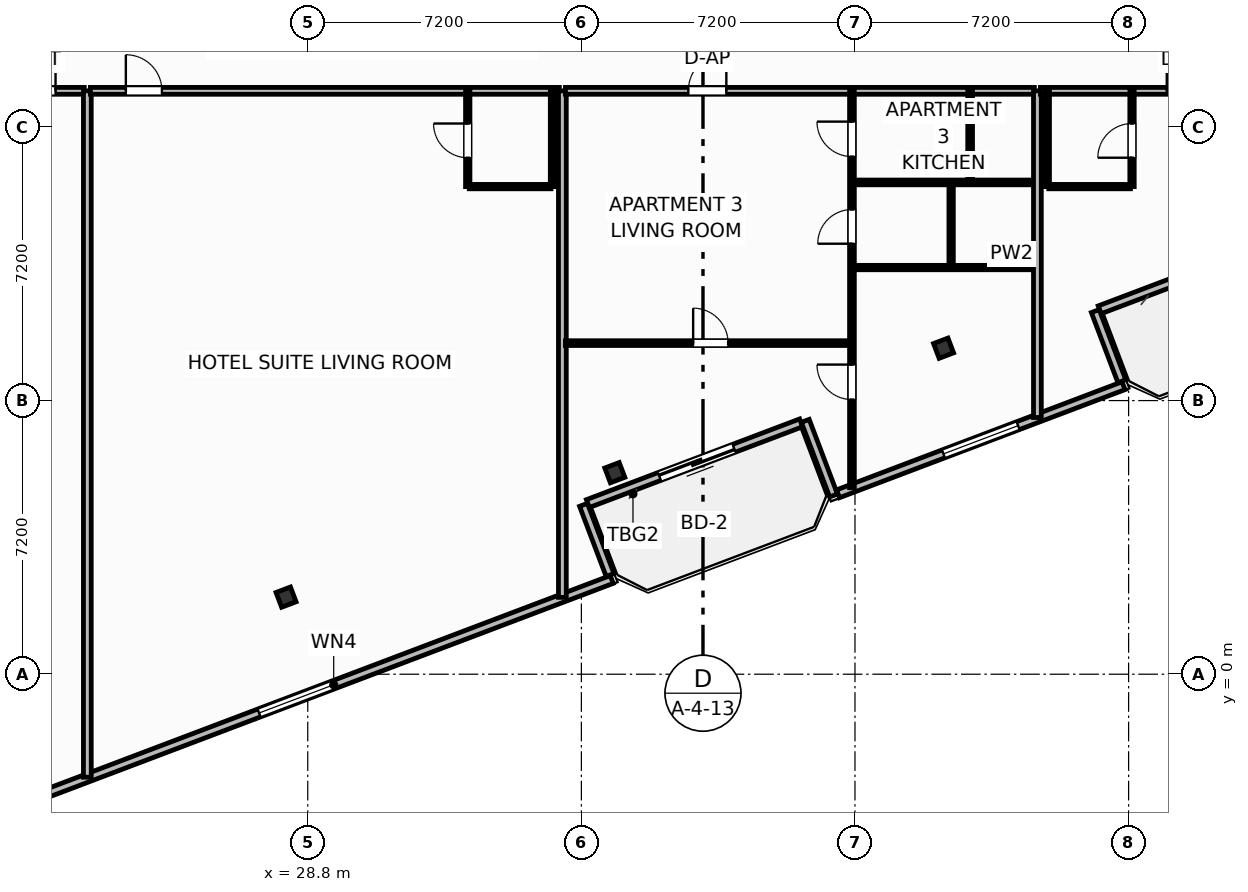
"""IFC4 building model, lengths in metres.
Left out: names, types, materials, properties, quantities, classifications, styles, units other than length and angle.
Written with IfcOpenShell. Run it as: python <this file> out.ifc"""

import sys

from ifc_helpers import new_model, si_unit, direction, frame, frame_2d, origin, origin_2d, place, context, subcontext, project, spatial, rectangle, i_section, extrude, element, fill, save


model = new_model("IFC4")
c1 = context("Model", 3, precision=1e-05, world=origin(), true_north=direction((0.0, 1.0)))
c2 = subcontext(c1, "Body", "Model", "MODEL_VIEW")
j1 = project(units=[si_unit("LENGTHUNIT", "METRE"), si_unit("PLANEANGLEUNIT", "RADIAN")], contexts=[c1])
p1 = place(None, origin())
s1 = spatial("IfcSite", under=j1, at=p1, CompositionType="ELEMENT")
p2 = place(p1, origin())
s2 = spatial("IfcBuilding", under=s1, at=p2, CompositionType="ELEMENT")
p3 = place(p2, frame((0.0, 0.0, 223.8)))
s3 = spatial("IfcBuildingStorey", under=s2, at=p3, CompositionType="ELEMENT", Elevation=223.8)
for number, where, z_axis, x_axis in (
    (1, (28.229, 2.028, 0.0), (0.0, 0.0, 1.0), (0.935, 0.354, 0.0)),
    (2, (36.88, 5.303, 0.0), (0.0, 0.0, 1.0), (0.935, 0.354, 0.0)),
    (3, (45.531, 8.578, 0.0), (0.0, 0.0, 1.0), (0.935, 0.354, 0.0)),
):
    element("IfcColumn", number, at=place(p3, frame(where, z_axis=z_axis, x_axis=x_axis)), inside=s3, PredefinedType="COLUMN", context=c2, shape_type="SweptSolid", body=[
        extrude(i_section(OverallWidth=0.406, OverallDepth=0.416, WebThickness=0.03, FlangeThickness=0.048, FilletRadius=0.025, at=origin_2d()), origin(), (0.0, 0.0, 1.0), 3.7),
    ])
p4 = place(p3, frame((41.783, 6.614, 0.0), z_axis=(0.0, 0.0, 1.0), x_axis=(-0.93521416643, -0.354082565101, 0.0)))
e4 = element("IfcWall", 4, at=p4, inside=s3, PredefinedType="SOLIDWALL", context=c2, shape_type="SweptSolid", body=[
    extrude(rectangle(XDim=6.0, YDim=0.22, at=frame_2d((3.0, 0.0))), origin(), (0.0, 0.0, 1.0), 2.73),
])
p5 = place(p4, frame((1.888, 0.0, 0.0)))
e5 = element("IfcOpeningElement", 5, at=p5, cuts=e4, PredefinedType="OPENING", context=c2, shape_type="SweptSolid", body=[
    extrude(rectangle(XDim=2.1, YDim=2.3, at=frame_2d((1.05, 1.15))), frame((0.0, 0.12, 0.0), z_axis=(0.0, -1.0, 0.0), x_axis=(1.0, 0.0, 0.0)), (0.0, 0.0, 1.0), 0.24),
])
p6 = place(p3, frame((55.25, 11.713, 0.0), z_axis=(0.0, 0.0, 1.0), x_axis=(-0.935227640088, -0.354046976001, 0.0)))
e6 = element("IfcWall", 6, at=p6, inside=s3, PredefinedType="SOLIDWALL", context=c2, shape_type="SweptSolid", body=[
    extrude(rectangle(XDim=6.0, YDim=0.22, at=frame_2d((3.0, 0.0))), origin(), (0.0, 0.0, 1.0), 2.73),
])
p7 = place(p6, frame((1.888, 0.0, 0.0)))
e7 = element("IfcOpeningElement", 7, at=p7, cuts=e6, PredefinedType="OPENING", context=c2, shape_type="SweptSolid", body=[
    extrude(rectangle(XDim=2.1, YDim=2.3, at=frame_2d((1.05, 1.15))), frame((0.0, 0.12, 0.0), z_axis=(0.0, -1.0, 0.0), x_axis=(1.0, 0.0, 0.0)), (0.0, 0.0, 1.0), 0.24),
])
p8 = place(p3, frame((20.202, -3.791, 0.0), z_axis=(0.0, 0.0, 1.0), x_axis=(0.935225574232, 0.354052432984, 0.0)))
e8 = element("IfcWall", 8, at=p8, inside=s3, PredefinedType="SOLIDWALL", context=c2, shape_type="SweptSolid", body=[
    extrude(rectangle(XDim=17.747, YDim=0.22, at=frame_2d((8.874, 0.0))), origin(), (0.0, 0.0, 1.0), 2.73),
])
p9 = place(p8, frame((7.823, 0.0, 0.8)))
e9 = element("IfcOpeningElement", 9, at=p9, cuts=e8, PredefinedType="OPENING", context=c2, shape_type="SweptSolid", body=[
    extrude(rectangle(XDim=2.1, YDim=1.75, at=frame_2d((1.05, 0.875))), frame((0.0, 0.12, 0.0), z_axis=(0.0, -1.0, 0.0), x_axis=(1.0, 0.0, 0.0)), (0.0, 0.0, 1.0), 0.24),
])
p10 = place(p3, frame((36.755, 2.61, 0.0), z_axis=(0.0, 0.0, 1.0), x_axis=(-0.354020680661, 0.935237594232, 0.0)))
e10 = element("IfcWall", 10, at=p10, inside=s3, PredefinedType="SOLIDWALL", context=c2, shape_type="SweptSolid", body=[
    extrude(rectangle(XDim=1.975, YDim=0.22, at=frame_2d((0.988, 0.0))), origin(), (0.0, 0.0, 1.0), 2.73),
])
p11 = place(p3, frame((41.892, 6.666, 0.0), z_axis=(0.0, 0.0, 1.0), x_axis=(0.354128469405, -0.935196785258, 0.0)))
e11 = element("IfcWall", 11, at=p11, inside=s3, PredefinedType="SOLIDWALL", context=c2, shape_type="SweptSolid", body=[
    extrude(rectangle(XDim=2.1, YDim=0.22, at=frame_2d((1.05, 0.0))), origin(), (0.0, 0.0, 1.0), 2.73),
])
p12 = place(p3, frame((42.752, 4.746, 0.0), z_axis=(0.0, 0.0, 1.0), x_axis=(0.935216926991, 0.354075273733, 0.0)))
e12 = element("IfcWall", 12, at=p12, inside=s3, PredefinedType="SOLIDWALL", context=c2, shape_type="SweptSolid", body=[
    extrude(rectangle(XDim=8.035, YDim=0.22, at=frame_2d((4.018, 0.0))), origin(), (0.0, 0.0, 1.0), 2.73),
])
p13 = place(p12, frame((2.968, 0.0, 0.8)))
e13 = element("IfcOpeningElement", 13, at=p13, cuts=e12, PredefinedType="OPENING", context=c2, shape_type="SweptSolid", body=[
    extrude(rectangle(XDim=2.1, YDim=1.75, at=frame_2d((1.05, 0.875))), frame((0.0, 0.12, 0.0), z_axis=(0.0, -1.0, 0.0), x_axis=(1.0, 0.0, 0.0)), (0.0, 0.0, 1.0), 0.24),
])
p14 = place(p3, frame((50.223, 7.708, 0.0), z_axis=(0.0, 0.0, 1.0), x_axis=(-0.354020680661, 0.935237594232, 0.0)))
e14 = element("IfcWall", 14, at=p14, inside=s3, PredefinedType="SOLIDWALL", context=c2, shape_type="SweptSolid", body=[
    extrude(rectangle(XDim=1.975, YDim=0.22, at=frame_2d((0.988, 0.0))), origin(), (0.0, 0.0, 1.0), 2.73),
])
p15 = place(p3, frame((7.764, 15.35, 0.0), z_axis=(0.0, 0.0, 1.0), x_axis=(1.0, 0.0, 0.0)))
e15 = element("IfcWall", 15, at=p15, inside=s3, PredefinedType="PARTITIONING", context=c2, shape_type="SweptSolid", body=[
    extrude(rectangle(XDim=15.156, YDim=0.18, at=frame_2d((7.578, 0.0))), origin(), (0.0, 0.0, 1.0), 3.45),
])
p16 = place(p15, frame((13.45, 0.0, 0.0)))
e16 = element("IfcOpeningElement", 16, at=p16, cuts=e15, PredefinedType="OPENING", context=c2, shape_type="SweptSolid", body=[
    extrude(rectangle(XDim=0.95, YDim=2.15, at=frame_2d((0.475, 1.075))), frame((0.0, 0.1, 0.0), z_axis=(0.0, -1.0, 0.0), x_axis=(1.0, 0.0, 0.0)), (0.0, 0.0, 1.0), 0.2),
])
p17 = place(p3, frame((23.0, -2.71, 0.0), z_axis=(0.0, 0.0, 1.0), x_axis=(0.0, 1.0, 0.0)))
e17 = element("IfcWall", 17, at=p17, inside=s3, PredefinedType="PARTITIONING", context=c2, shape_type="SweptSolid", body=[
    extrude(rectangle(XDim=18.06, YDim=0.205, at=frame_2d((9.03, 0.0))), origin(), (0.0, 0.0, 1.0), 3.45),
])
p18 = place(p3, frame((23.08, 15.35, 0.0), z_axis=(0.0, 0.0, 1.0), x_axis=(1.0, 0.0, 0.0)))
e18 = element("IfcWall", 18, at=p18, inside=s3, PredefinedType="PARTITIONING", context=c2, shape_type="SweptSolid", body=[
    extrude(rectangle(XDim=12.34, YDim=0.18, at=frame_2d((6.17, 0.0))), origin(), (0.0, 0.0, 1.0), 3.45),
])
p19 = place(p18, frame((0.933, 0.0, 0.0)))
e19 = element("IfcOpeningElement", 19, at=p19, cuts=e18, PredefinedType="OPENING", context=c2, shape_type="SweptSolid", body=[
    extrude(rectangle(XDim=0.95, YDim=2.15, at=frame_2d((0.475, 1.075))), frame((0.0, 0.1, 0.0), z_axis=(0.0, -1.0, 0.0), x_axis=(1.0, 0.0, 0.0)), (0.0, 0.0, 1.0), 0.2),
])
p20 = place(p3, frame((33.05, 12.83, 0.0), z_axis=(0.0, 0.0, 1.0), x_axis=(1.0, 0.0, 0.0)))
e20 = element("IfcWall", 20, at=p20, inside=s3, PredefinedType="PARTITIONING", context=c2, shape_type="SweptSolid", body=[
    extrude(rectangle(XDim=2.15, YDim=0.115, at=frame_2d((1.075, 0.0))), origin(), (0.0, 0.0, 1.0), 3.45),
])
p21 = place(p3, frame((33.01, 12.83, 0.0), z_axis=(0.0, 0.0, 1.0), x_axis=(0.0, 1.0, 0.0)))
e21 = element("IfcWall", 21, at=p21, inside=s3, PredefinedType="PARTITIONING", context=c2, shape_type="SweptSolid", body=[
    extrude(rectangle(XDim=2.52, YDim=0.115, at=frame_2d((1.26, 0.0))), origin(), (0.0, 0.0, 1.0), 3.45),
])
p22 = place(p21, frame((0.76, 0.0, 0.0)))
e22 = element("IfcOpeningElement", 22, at=p22, cuts=e21, PredefinedType="OPENING", context=c2, shape_type="SweptSolid", body=[
    extrude(rectangle(XDim=0.9, YDim=2.05, at=frame_2d((0.45, 1.025))), frame((0.0, 0.067, 0.0), z_axis=(0.0, -1.0, 0.0), x_axis=(1.0, 0.0, 0.0)), (0.0, 0.0, 1.0), 0.135),
])
p23 = place(p3, frame((35.24, 12.83, 0.0), z_axis=(0.0, 0.0, 1.0), x_axis=(0.0, 1.0, 0.0)))
e23 = element("IfcWall", 23, at=p23, inside=s3, PredefinedType="PARTITIONING", context=c2, shape_type="SweptSolid", body=[
    extrude(rectangle(XDim=2.52, YDim=0.115, at=frame_2d((1.26, 0.0))), origin(), (0.0, 0.0, 1.0), 2.739),
])
p24 = place(p3, frame((35.5, 2.022, 0.0), z_axis=(0.0, 0.0, 1.0), x_axis=(0.0, 1.0, 0.0)))
e24 = element("IfcWall", 24, at=p24, inside=s3, PredefinedType="PARTITIONING", context=c2, shape_type="SweptSolid", body=[
    extrude(rectangle(XDim=13.328, YDim=0.205, at=frame_2d((6.664, 0.0))), origin(), (0.0, 0.0, 1.0), 2.739),
])
p25 = place(p3, frame((35.58, 8.712, 0.0), z_axis=(0.0, 0.0, 1.0), x_axis=(1.0, 0.0, 0.0)))
e25 = element("IfcWall", 25, at=p25, inside=s3, PredefinedType="PARTITIONING", context=c2, shape_type="SweptSolid", body=[
    extrude(rectangle(XDim=7.47, YDim=0.125, at=frame_2d((3.735, 0.0))), origin(), (0.0, 0.0, 1.0), 3.45),
])
p26 = place(p25, frame((3.362, 0.0, 0.0)))
e26 = element("IfcOpeningElement", 26, at=p26, cuts=e25, PredefinedType="OPENING", context=c2, shape_type="SweptSolid", body=[
    extrude(rectangle(XDim=0.92, YDim=2.05, at=frame_2d((0.46, 1.025))), frame((0.0, 0.073, 0.0), z_axis=(0.0, -1.0, 0.0), x_axis=(1.0, 0.0, 0.0)), (0.0, 0.0, 1.0), 0.145),
])
p27 = place(p3, frame((35.58, 15.35, 0.0), z_axis=(0.0, 0.0, 1.0), x_axis=(1.0, 0.0, 0.0)))
e27 = element("IfcWall", 27, at=p27, inside=s3, PredefinedType="PARTITIONING", context=c2, shape_type="SweptSolid", body=[
    extrude(rectangle(XDim=12.34, YDim=0.18, at=frame_2d((6.17, 0.0))), origin(), (0.0, 0.0, 1.0), 3.45),
])
p28 = place(p27, frame((3.235, 0.0, 0.0)))
e28 = element("IfcOpeningElement", 28, at=p28, cuts=e27, PredefinedType="OPENING", context=c2, shape_type="SweptSolid", body=[
    extrude(rectangle(XDim=1.0, YDim=2.2, at=frame_2d((0.5, 1.1))), frame((0.0, 0.1, 0.0), z_axis=(0.0, -1.0, 0.0), x_axis=(1.0, 0.0, 0.0)), (0.0, 0.0, 1.0), 0.2),
])
p29 = place(p3, frame((43.12, 4.907, 0.0), z_axis=(0.0, 0.0, 1.0), x_axis=(0.0, 1.0, 0.0)))
e29 = element("IfcWall", 29, at=p29, inside=s3, PredefinedType="PARTITIONING", context=c2, shape_type="SweptSolid", body=[
    extrude(rectangle(XDim=10.443, YDim=0.125, at=frame_2d((5.222, 0.0))), origin(), (0.0, 0.0, 1.0), 3.45),
])
p30 = place(p29, frame((2.32, 0.0, 0.0)))
e30 = element("IfcOpeningElement", 30, at=p30, cuts=e29, PredefinedType="OPENING", context=c2, shape_type="SweptSolid", body=[
    extrude(rectangle(XDim=0.92, YDim=2.05, at=frame_2d((0.46, 1.025))), frame((0.0, 0.073, 0.0), z_axis=(0.0, -1.0, 0.0), x_axis=(1.0, 0.0, 0.0)), (0.0, 0.0, 1.0), 0.145),
])
p31 = place(p29, frame((6.42, 0.0, 0.0)))
e31 = element("IfcOpeningElement", 31, at=p31, cuts=e29, PredefinedType="OPENING", context=c2, shape_type="SweptSolid", body=[
    extrude(rectangle(XDim=0.9, YDim=2.05, at=frame_2d((0.45, 1.025))), frame((0.0, 0.073, 0.0), z_axis=(0.0, -1.0, 0.0), x_axis=(1.0, 0.0, 0.0)), (0.0, 0.0, 1.0), 0.145),
])
p32 = place(p29, frame((8.713, 0.0, 0.0)))
e32 = element("IfcOpeningElement", 32, at=p32, cuts=e29, PredefinedType="OPENING", context=c2, shape_type="SweptSolid", body=[
    extrude(rectangle(XDim=0.92, YDim=2.05, at=frame_2d((0.46, 1.025))), frame((0.0, 0.073, 0.0), z_axis=(0.0, -1.0, 0.0), x_axis=(1.0, 0.0, 0.0)), (0.0, 0.0, 1.0), 0.145),
])
p33 = place(p3, frame((43.19, 12.94, 0.0), z_axis=(0.0, 0.0, 1.0), x_axis=(1.0, 0.0, 0.0)))
e33 = element("IfcWall", 33, at=p33, inside=s3, PredefinedType="PARTITIONING", context=c2, shape_type="SweptSolid", body=[
    extrude(rectangle(XDim=4.73, YDim=0.125, at=frame_2d((2.365, 0.0))), origin(), (0.0, 0.0, 1.0), 3.018),
])
p34 = place(p3, frame((43.19, 10.7, 0.0), z_axis=(0.0, 0.0, 1.0), x_axis=(1.0, 0.0, 0.0)))
e34 = element("IfcWall", 34, at=p34, inside=s3, PredefinedType="PARTITIONING", context=c2, shape_type="SweptSolid", body=[
    extrude(rectangle(XDim=4.73, YDim=0.115, at=frame_2d((2.365, 0.0))), origin(), (0.0, 0.0, 1.0), 3.45),
])
p35 = place(p3, frame((46.23, 12.94, 0.0), z_axis=(0.0, 0.0, 1.0), x_axis=(0.0, 1.0, 0.0)))
e35 = element("IfcWall", 35, at=p35, inside=s3, PredefinedType="PARTITIONING", context=c2, shape_type="SweptSolid", body=[
    extrude(rectangle(XDim=2.41, YDim=0.125, at=frame_2d((1.205, 0.0))), origin(), (0.0, 0.0, 1.0), 3.45),
])
p36 = place(p3, frame((45.73, 10.7, 0.0), z_axis=(0.0, 0.0, 1.0), x_axis=(0.0, 1.0, 0.0)))
e36 = element("IfcWall", 36, at=p36, inside=s3, PredefinedType="PARTITIONING", context=c2, shape_type="SweptSolid", body=[
    extrude(rectangle(XDim=2.24, YDim=0.115, at=frame_2d((1.12, 0.0))), origin(), (0.0, 0.0, 1.0), 3.45),
])
p37 = place(p3, frame((48.0, 6.754, 0.0), z_axis=(0.0, 0.0, 1.0), x_axis=(0.0, 1.0, 0.0)))
e37 = element("IfcWall", 37, at=p37, inside=s3, PredefinedType="PARTITIONING", context=c2, shape_type="SweptSolid", body=[
    extrude(rectangle(XDim=8.596, YDim=0.205, at=frame_2d((4.298, 0.0))), origin(), (0.0, 0.0, 1.0), 3.45),
])
p38 = place(p3, frame((48.08, 15.35, 0.0), z_axis=(0.0, 0.0, 1.0), x_axis=(1.0, 0.0, 0.0)))
e38 = element("IfcWall", 38, at=p38, inside=s3, PredefinedType="PARTITIONING", context=c2, shape_type="SweptSolid", body=[
    extrude(rectangle(XDim=22.624, YDim=0.18, at=frame_2d((11.312, 0.0))), origin(), (0.0, 0.0, 1.0), 3.45),
])
p39 = place(p38, frame((3.324, 0.0, 0.0)))
e39 = element("IfcOpeningElement", 39, at=p39, cuts=e38, PredefinedType="OPENING", context=c2, shape_type="SweptSolid", body=[
    extrude(rectangle(XDim=0.95, YDim=2.15, at=frame_2d((0.475, 1.075))), frame((0.0, 0.1, 0.0), z_axis=(0.0, -1.0, 0.0), x_axis=(1.0, 0.0, 0.0)), (0.0, 0.0, 1.0), 0.2),
])
p40 = place(p3, frame((48.3, 12.83, 0.0), z_axis=(0.0, 0.0, 1.0), x_axis=(1.0, 0.0, 0.0)))
e40 = element("IfcWall", 40, at=p40, inside=s3, PredefinedType="PARTITIONING", context=c2, shape_type="SweptSolid", body=[
    extrude(rectangle(XDim=2.15, YDim=0.115, at=frame_2d((1.075, 0.0))), origin(), (0.0, 0.0, 1.0), 3.45),
])
p41 = place(p3, frame((50.49, 12.83, 0.0), z_axis=(0.0, 0.0, 1.0), x_axis=(0.0, 1.0, 0.0)))
e41 = element("IfcWall", 41, at=p41, inside=s3, PredefinedType="PARTITIONING", context=c2, shape_type="SweptSolid", body=[
    extrude(rectangle(XDim=2.52, YDim=0.115, at=frame_2d((1.26, 0.0))), origin(), (0.0, 0.0, 1.0), 3.45),
])
p42 = place(p41, frame((0.76, 0.0, 0.0)))
e42 = element("IfcOpeningElement", 42, at=p42, cuts=e41, PredefinedType="OPENING", context=c2, shape_type="SweptSolid", body=[
    extrude(rectangle(XDim=0.9, YDim=2.05, at=frame_2d((0.45, 1.025))), frame((0.0, 0.067, 0.0), z_axis=(0.0, -1.0, 0.0), x_axis=(1.0, 0.0, 0.0)), (0.0, 0.0, 1.0), 0.135),
])
p43 = place(p3, frame((48.26, 12.83, 0.0), z_axis=(0.0, 0.0, 1.0), x_axis=(0.0, 1.0, 0.0)))
e43 = element("IfcWall", 43, at=p43, inside=s3, PredefinedType="PARTITIONING", context=c2, shape_type="SweptSolid", body=[
    extrude(rectangle(XDim=2.52, YDim=0.115, at=frame_2d((1.26, 0.0))), origin(), (0.0, 0.0, 1.0), 3.45),
])
p44 = place(p5, origin())
e44 = element("IfcDoor", 44, at=p44, inside=s3, OperationType="SLIDING_TO_LEFT", PredefinedType="DOOR", context=c2, shape_type="SweptSolid", body=[
    extrude(rectangle(XDim=2.1, YDim=2.3, at=frame_2d((1.05, 1.15))), frame((0.0, 0.025, 0.0), z_axis=(0.0, -1.0, 0.0), x_axis=(1.0, 0.0, 0.0)), (0.0, 0.0, 1.0), 0.05),
])
fill(e5, e44)
p45 = place(p9, origin())
e45 = element("IfcWindow", 45, at=p45, inside=s3, PartitioningType="SINGLE_PANEL", PredefinedType="WINDOW", context=c2, shape_type="SweptSolid", body=[
    extrude(rectangle(XDim=2.1, YDim=1.75, at=frame_2d((1.05, 0.875))), frame((0.0, 0.03, 0.0), z_axis=(0.0, -1.0, 0.0), x_axis=(1.0, 0.0, 0.0)), (0.0, 0.0, 1.0), 0.06),
])
fill(e9, e45)
p46 = place(p13, origin())
e46 = element("IfcWindow", 46, at=p46, inside=s3, PartitioningType="SINGLE_PANEL", PredefinedType="WINDOW", context=c2, shape_type="SweptSolid", body=[
    extrude(rectangle(XDim=2.1, YDim=1.75, at=frame_2d((1.05, 0.875))), frame((0.0, 0.03, 0.0), z_axis=(0.0, -1.0, 0.0), x_axis=(1.0, 0.0, 0.0)), (0.0, 0.0, 1.0), 0.06),
])
fill(e13, e46)
p47 = place(p16, origin())
e47 = element("IfcDoor", 47, at=p47, inside=s3, OperationType="SINGLE_SWING_RIGHT", PredefinedType="DOOR", context=c2, shape_type="SweptSolid", body=[
    extrude(rectangle(XDim=0.95, YDim=2.15, at=frame_2d((0.475, 1.075))), frame((0.0, 0.025, 0.0), z_axis=(0.0, -1.0, 0.0), x_axis=(1.0, 0.0, 0.0)), (0.0, 0.0, 1.0), 0.05),
])
fill(e16, e47)
p48 = place(p19, origin())
e48 = element("IfcDoor", 48, at=p48, inside=s3, OperationType="SINGLE_SWING_LEFT", PredefinedType="DOOR", context=c2, shape_type="SweptSolid", body=[
    extrude(rectangle(XDim=0.95, YDim=2.15, at=frame_2d((0.475, 1.075))), frame((0.0, 0.025, 0.0), z_axis=(0.0, -1.0, 0.0), x_axis=(1.0, 0.0, 0.0)), (0.0, 0.0, 1.0), 0.05),
])
fill(e19, e48)
p49 = place(p22, origin())
e49 = element("IfcDoor", 49, at=p49, inside=s3, OperationType="SINGLE_SWING_RIGHT", PredefinedType="DOOR", context=c2, shape_type="SweptSolid", body=[
    extrude(rectangle(XDim=0.9, YDim=2.05, at=frame_2d((0.45, 1.025))), frame((0.0, 0.025, 0.0), z_axis=(0.0, -1.0, 0.0), x_axis=(1.0, 0.0, 0.0)), (0.0, 0.0, 1.0), 0.05),
])
fill(e22, e49)
p50 = place(p26, origin())
e50 = element("IfcDoor", 50, at=p50, inside=s3, OperationType="SINGLE_SWING_LEFT", PredefinedType="DOOR", context=c2, shape_type="SweptSolid", body=[
    extrude(rectangle(XDim=0.92, YDim=2.05, at=frame_2d((0.46, 1.025))), frame((0.0, 0.025, 0.0), z_axis=(0.0, -1.0, 0.0), x_axis=(1.0, 0.0, 0.0)), (0.0, 0.0, 1.0), 0.05),
])
fill(e26, e50)
p51 = place(p28, origin())
e51 = element("IfcDoor", 51, at=p51, inside=s3, OperationType="SINGLE_SWING_RIGHT", PredefinedType="DOOR", context=c2, shape_type="SweptSolid", body=[
    extrude(rectangle(XDim=1.0, YDim=2.2, at=frame_2d((0.5, 1.1))), frame((0.0, 0.025, 0.0), z_axis=(0.0, -1.0, 0.0), x_axis=(1.0, 0.0, 0.0)), (0.0, 0.0, 1.0), 0.05),
])
fill(e28, e51)
p52 = place(p30, origin())
e52 = element("IfcDoor", 52, at=p52, inside=s3, OperationType="SINGLE_SWING_RIGHT", PredefinedType="DOOR", context=c2, shape_type="SweptSolid", body=[
    extrude(rectangle(XDim=0.92, YDim=2.05, at=frame_2d((0.46, 1.025))), frame((0.0, 0.025, 0.0), z_axis=(0.0, -1.0, 0.0), x_axis=(1.0, 0.0, 0.0)), (0.0, 0.0, 1.0), 0.05),
])
fill(e30, e52)
p53 = place(p31, origin())
e53 = element("IfcDoor", 53, at=p53, inside=s3, OperationType="SINGLE_SWING_LEFT", PredefinedType="DOOR", context=c2, shape_type="SweptSolid", body=[
    extrude(rectangle(XDim=0.9, YDim=2.05, at=frame_2d((0.45, 1.025))), frame((0.0, 0.025, 0.0), z_axis=(0.0, -1.0, 0.0), x_axis=(1.0, 0.0, 0.0)), (0.0, 0.0, 1.0), 0.05),
])
fill(e31, e53)
p54 = place(p32, origin())
e54 = element("IfcDoor", 54, at=p54, inside=s3, OperationType="SINGLE_SWING_RIGHT", PredefinedType="DOOR", context=c2, shape_type="SweptSolid", body=[
    extrude(rectangle(XDim=0.92, YDim=2.05, at=frame_2d((0.46, 1.025))), frame((0.0, 0.025, 0.0), z_axis=(0.0, -1.0, 0.0), x_axis=(1.0, 0.0, 0.0)), (0.0, 0.0, 1.0), 0.05),
])
fill(e32, e54)
p55 = place(p39, origin())
e55 = element("IfcDoor", 55, at=p55, inside=s3, OperationType="SINGLE_SWING_LEFT", PredefinedType="DOOR", context=c2, shape_type="SweptSolid", body=[
    extrude(rectangle(XDim=0.95, YDim=2.15, at=frame_2d((0.475, 1.075))), frame((0.0, 0.025, 0.0), z_axis=(0.0, -1.0, 0.0), x_axis=(1.0, 0.0, 0.0)), (0.0, 0.0, 1.0), 0.05),
])
fill(e39, e55)
p56 = place(p42, origin())
e56 = element("IfcDoor", 56, at=p56, inside=s3, OperationType="SINGLE_SWING_LEFT", PredefinedType="DOOR", context=c2, shape_type="SweptSolid", body=[
    extrude(rectangle(XDim=0.9, YDim=2.05, at=frame_2d((0.45, 1.025))), frame((0.0, 0.025, 0.0), z_axis=(0.0, -1.0, 0.0), x_axis=(1.0, 0.0, 0.0)), (0.0, 0.0, 1.0), 0.05),
])
fill(e42, e56)
save(model, sys.argv[1])
